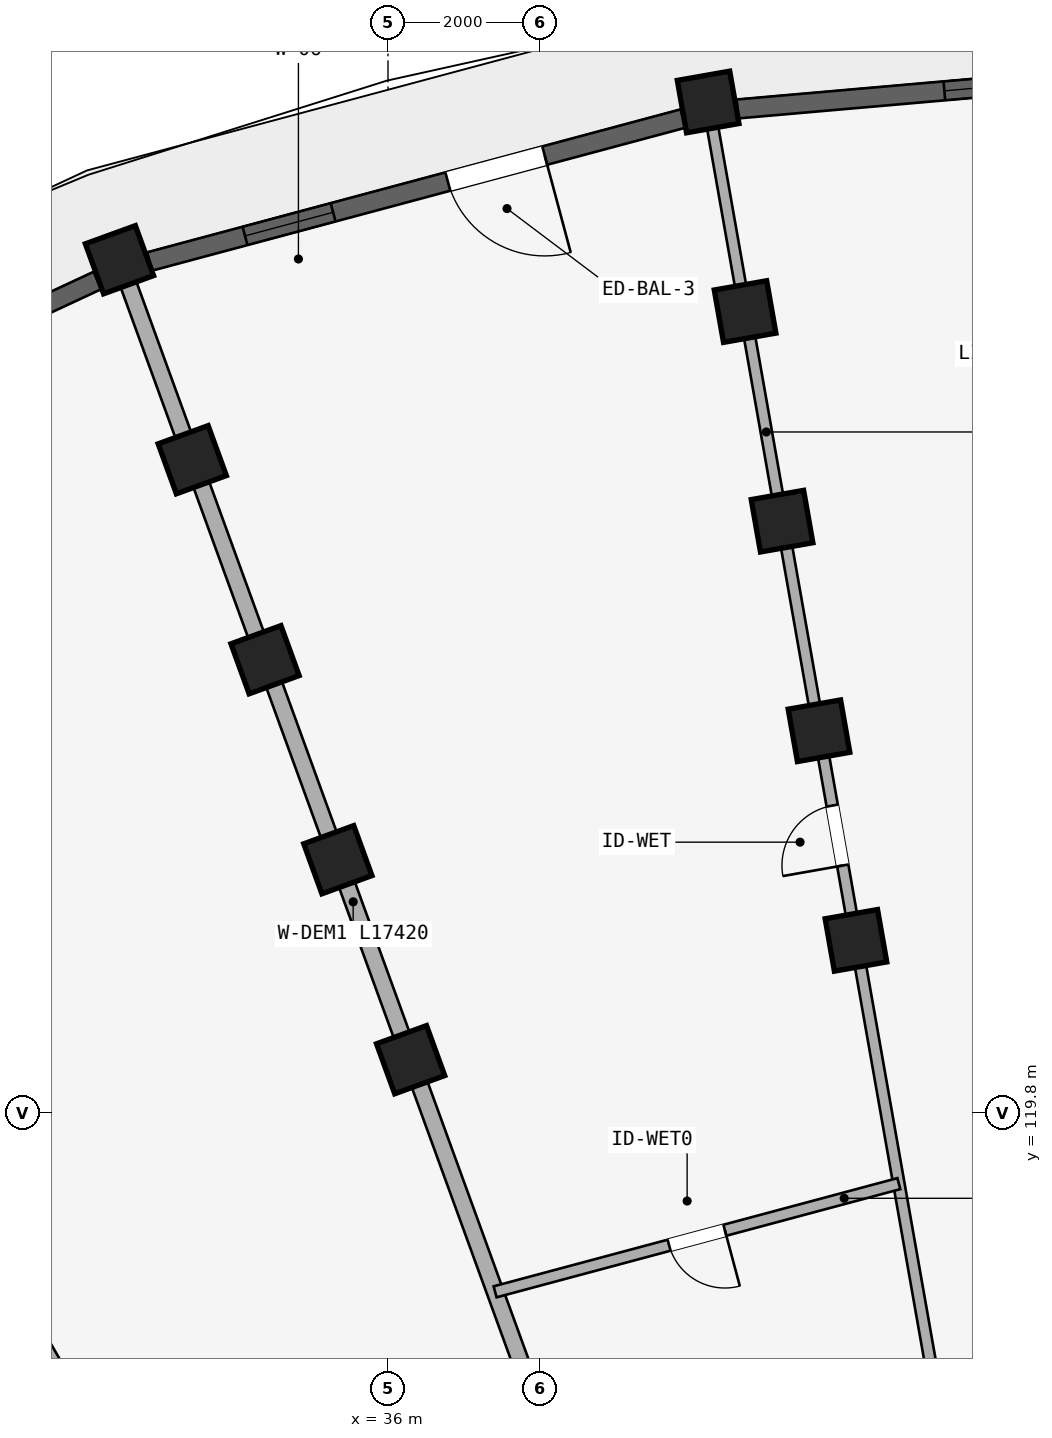
"""IFC4 building model, lengths in metres.
Left out: names, types, materials, properties, quantities, classifications, styles, units other than length and angle.
Written with IfcOpenShell. Run it as: python <this file> out.ifc"""

import sys

from ifc_helpers import new_model, si_unit, direction, frame, frame_2d, origin, origin_2d, place, context, subcontext, project, spatial, rectangle, extrude, element, fill, save


model = new_model("IFC4")
c1 = context("Model", 3, precision=1e-05, world=origin(), true_north=direction((0.0, 1.0)))
c2 = subcontext(c1, "Body", "Model", "MODEL_VIEW")
j1 = project(units=[si_unit("LENGTHUNIT", "METRE"), si_unit("PLANEANGLEUNIT", "RADIAN")], contexts=[c1])
p1 = place(None, origin())
s1 = spatial("IfcSite", under=j1, at=p1, CompositionType="ELEMENT")
p2 = place(p1, origin())
s2 = spatial("IfcBuilding", under=s1, at=p2, CompositionType="ELEMENT")
p3 = place(p2, frame((0.0, 0.0, 24.45)))
s3 = spatial("IfcBuildingStorey", under=s2, at=p3, CompositionType="ELEMENT", Elevation=24.45)
for number, where, z_axis, x_axis in (
    (1, (42.157, 122.071, 0.0), (0.0, 0.0, 1.0), (0.985, 0.174, 0.0)),
    (2, (41.671, 124.829, 0.0), (0.0, 0.0, 1.0), (0.985, 0.174, 0.0)),
    (3, (41.185, 127.586, 0.0), (0.0, 0.0, 1.0), (0.985, 0.174, 0.0)),
    (4, (40.698, 130.344, 0.0), (0.0, 0.0, 1.0), (0.985, 0.174, 0.0)),
    (5, (40.212, 133.101, 0.0), (0.0, 0.0, 1.0), (0.985, 0.174, 0.0)),
    (6, (36.298, 120.501, 0.0), (0.0, 0.0, 1.0), (0.94, 0.342, 0.0)),
    (7, (35.34, 123.132, 0.0), (0.0, 0.0, 1.0), (0.94, 0.342, 0.0)),
    (8, (34.382, 125.764, 0.0), (0.0, 0.0, 1.0), (0.94, 0.342, 0.0)),
    (9, (33.425, 128.395, 0.0), (0.0, 0.0, 1.0), (0.94, 0.342, 0.0)),
    (10, (32.467, 131.026, 0.0), (0.0, 0.0, 1.0), (0.94, 0.342, 0.0)),
):
    element("IfcColumn", number, at=place(p3, frame(where, z_axis=z_axis, x_axis=x_axis)), inside=s3, PredefinedType="COLUMN", context=c2, shape_type="SweptSolid", body=[
        extrude(rectangle(XDim=0.7, YDim=0.7, at=origin_2d()), origin(), (0.0, 0.0, 1.0), 2.93),
    ])
p4 = place(p3, frame((43.286, 115.67, 0.0), z_axis=(0.0, 0.0, 1.0), x_axis=(-0.173646216546, 0.984808098809, 0.0)))
e11 = element("IfcWall", 11, at=p4, inside=s3, PredefinedType="PARTITIONING", context=c2, shape_type="SweptSolid", body=[
    extrude(rectangle(XDim=17.42, YDim=0.15, at=frame_2d((8.71, 0.0))), origin(), (0.0, 0.0, 1.0), 2.372),
])
p5 = place(p4, frame((7.5, 0.0, 0.0)))
e12 = element("IfcOpeningElement", 12, at=p5, cuts=e11, PredefinedType="OPENING", context=c2, shape_type="SweptSolid", body=[
    extrude(rectangle(XDim=0.8, YDim=2.1, at=frame_2d((0.4, 1.05))), frame((0.0, 0.085, 0.0), z_axis=(0.0, -1.0, 0.0), x_axis=(1.0, 0.0, 0.0)), (0.0, 0.0, 1.0), 0.17),
])
p6 = place(p3, frame((38.521, 114.393, 0.0), z_axis=(0.0, 0.0, 1.0), x_axis=(-0.342022120477, 0.939691901159, 0.0)))
e13 = element("IfcWall", 13, at=p6, inside=s3, PredefinedType="STANDARD", context=c2, shape_type="SweptSolid", body=[
    extrude(rectangle(XDim=17.42, YDim=0.22, at=frame_2d((8.71, 0.0))), origin(), (0.0, 0.0, 1.0), 2.372),
])
p7 = place(p3, frame((34.05, 112.309, 0.0), z_axis=(0.0, 0.0, 1.0), x_axis=(-0.499997843263, 0.866026648973, 0.0)))
e14 = element("IfcWall", 14, at=p7, inside=s3, PredefinedType="PARTITIONING", context=c2, shape_type="SweptSolid", body=[
    extrude(rectangle(XDim=17.42, YDim=0.15, at=frame_2d((8.71, 0.0))), origin(), (0.0, 0.0, 1.0), 2.372),
])
p8 = place(p7, frame((7.5, 0.0, 0.0)))
e15 = element("IfcOpeningElement", 15, at=p8, cuts=e14, PredefinedType="OPENING", context=c2, shape_type="SweptSolid", body=[
    extrude(rectangle(XDim=0.8, YDim=2.1, at=frame_2d((0.4, 1.05))), frame((0.0, 0.085, 0.0), z_axis=(0.0, -1.0, 0.0), x_axis=(1.0, 0.0, 0.0)), (0.0, 0.0, 1.0), 0.17),
])
p9 = place(p3, frame((42.721, 118.871, 0.0), z_axis=(0.0, 0.0, 1.0), x_axis=(-0.965929227513, -0.258806351229, 0.0)))
e16 = element("IfcWall", 16, at=p9, inside=s3, PredefinedType="PLUMBINGWALL", context=c2, shape_type="SweptSolid", body=[
    extrude(rectangle(XDim=5.5, YDim=0.15, at=frame_2d((2.75, 0.0))), origin(), (0.0, 0.0, 1.0), 2.372),
])
p10 = place(p9, frame((2.37, 0.0, 0.0)))
e17 = element("IfcOpeningElement", 17, at=p10, cuts=e16, PredefinedType="OPENING", context=c2, shape_type="SweptSolid", body=[
    extrude(rectangle(XDim=0.76, YDim=2.05, at=frame_2d((0.38, 1.025))), frame((0.0, 0.085, 0.0), z_axis=(0.0, -1.0, 0.0), x_axis=(1.0, 0.0, 0.0)), (0.0, 0.0, 1.0), 0.17),
])
p11 = place(p3, frame((47.836, 133.643, 0.0), z_axis=(0.0, 0.0, 1.0), x_axis=(-0.99619214922, -0.08718487158, 0.0)))
e18 = element("IfcWall", 18, at=p11, inside=s3, PredefinedType="STANDARD", context=c2, shape_type="SweptSolid", body=[
    extrude(rectangle(XDim=7.267, YDim=0.25, at=frame_2d((3.633, 0.0))), origin(), (0.0, 0.0, 1.0), 2.372),
])
p12 = place(p11, frame((2.733, 0.0, 0.522)))
e19 = element("IfcOpeningElement", 19, at=p12, cuts=e18, PredefinedType="OPENING", context=c2, shape_type="SweptSolid", body=[
    extrude(rectangle(XDim=1.8, YDim=1.65, at=frame_2d((0.9, 0.825))), frame((0.0, 0.135, 0.0), z_axis=(0.0, -1.0, 0.0), x_axis=(1.0, 0.0, 0.0)), (0.0, 0.0, 1.0), 0.27),
])
p13 = place(p3, frame((39.882, 132.883, 0.0), z_axis=(0.0, 0.0, 1.0), x_axis=(-0.965930355787, -0.258802140196, 0.0)))
e20 = element("IfcWall", 20, at=p13, inside=s3, PredefinedType="STANDARD", context=c2, shape_type="SweptSolid", body=[
    extrude(rectangle(XDim=7.267, YDim=0.25, at=frame_2d((3.633, 0.0))), origin(), (0.0, 0.0, 1.0), 2.372),
])
p14 = place(p13, frame((4.766, 0.0, 0.422)))
e21 = element("IfcOpeningElement", 21, at=p14, cuts=e20, PredefinedType="OPENING", context=c2, shape_type="SweptSolid", body=[
    extrude(rectangle(XDim=1.2, YDim=1.5, at=frame_2d((0.6, 0.75))), frame((0.0, 0.135, 0.0), z_axis=(0.0, -1.0, 0.0), x_axis=(1.0, 0.0, 0.0)), (0.0, 0.0, 1.0), 0.27),
])
p15 = place(p13, frame((1.883, 0.0, 0.0)))
e22 = element("IfcOpeningElement", 22, at=p15, cuts=e20, PredefinedType="OPENING", context=c2, shape_type="SweptSolid", body=[
    extrude(rectangle(XDim=1.32, YDim=2.15, at=frame_2d((0.66, 1.075))), frame((0.0, 0.135, 0.0), z_axis=(0.0, -1.0, 0.0), x_axis=(1.0, 0.0, 0.0)), (0.0, 0.0, 1.0), 0.27),
])
p16 = place(p3, frame((32.179, 130.754, 0.0), z_axis=(0.0, 0.0, 1.0), x_axis=(-0.90630327107, -0.422627946127, 0.0)))
e23 = element("IfcWall", 23, at=p16, inside=s3, PredefinedType="STANDARD", context=c2, shape_type="SweptSolid", body=[
    extrude(rectangle(XDim=7.267, YDim=0.25, at=frame_2d((3.633, 0.0))), origin(), (0.0, 0.0, 1.0), 2.372),
])
p17 = place(p16, frame((2.733, 0.0, 0.522)))
e24 = element("IfcOpeningElement", 24, at=p17, cuts=e23, PredefinedType="OPENING", context=c2, shape_type="SweptSolid", body=[
    extrude(rectangle(XDim=1.8, YDim=1.65, at=frame_2d((0.9, 0.825))), frame((0.0, 0.135, 0.0), z_axis=(0.0, -1.0, 0.0), x_axis=(1.0, 0.0, 0.0)), (0.0, 0.0, 1.0), 0.27),
])
p18 = place(p12, origin())
e25 = element("IfcWindow", 25, at=p18, inside=s3, PartitioningType="DOUBLE_PANEL_VERTICAL", PredefinedType="WINDOW", context=c2, shape_type="SweptSolid", body=[
    extrude(rectangle(XDim=1.8, YDim=1.65, at=frame_2d((0.9, 0.825))), frame((0.0, 0.03, 0.0), z_axis=(0.0, -1.0, 0.0), x_axis=(1.0, 0.0, 0.0)), (0.0, 0.0, 1.0), 0.06),
])
fill(e19, e25)
p19 = place(p14, origin())
e26 = element("IfcWindow", 26, at=p19, inside=s3, PartitioningType="SINGLE_PANEL", PredefinedType="WINDOW", context=c2, shape_type="SweptSolid", body=[
    extrude(rectangle(XDim=1.2, YDim=1.5, at=frame_2d((0.6, 0.75))), frame((0.0, 0.03, 0.0), z_axis=(0.0, -1.0, 0.0), x_axis=(1.0, 0.0, 0.0)), (0.0, 0.0, 1.0), 0.06),
])
fill(e21, e26)
p20 = place(p5, frame((0.8, 0.0, 0.0), z_axis=(0.0, 0.0, 1.0), x_axis=(-1.0, 0.0, 0.0)))
e27 = element("IfcDoor", 27, at=p20, inside=s3, OperationType="SINGLE_SWING_RIGHT", PredefinedType="DOOR", context=c2, shape_type="SweptSolid", body=[
    extrude(rectangle(XDim=0.8, YDim=2.1, at=frame_2d((0.4, 1.05))), frame((0.0, 0.025, 0.0), z_axis=(0.0, -1.0, 0.0), x_axis=(1.0, 0.0, 0.0)), (0.0, 0.0, 1.0), 0.05),
])
fill(e12, e27)
p21 = place(p10, origin())
e28 = element("IfcDoor", 28, at=p21, inside=s3, OperationType="SINGLE_SWING_LEFT", PredefinedType="DOOR", context=c2, shape_type="SweptSolid", body=[
    extrude(rectangle(XDim=0.76, YDim=2.05, at=frame_2d((0.38, 1.025))), frame((0.0, 0.025, 0.0), z_axis=(0.0, -1.0, 0.0), x_axis=(1.0, 0.0, 0.0)), (0.0, 0.0, 1.0), 0.05),
])
fill(e17, e28)
p22 = place(p15, frame((1.32, 0.0, 0.0), z_axis=(0.0, 0.0, 1.0), x_axis=(-1.0, 0.0, 0.0)))
e29 = element("IfcDoor", 29, at=p22, inside=s3, OperationType="SINGLE_SWING_RIGHT", PredefinedType="DOOR", context=c2, shape_type="SweptSolid", body=[
    extrude(rectangle(XDim=1.32, YDim=2.15, at=frame_2d((0.66, 1.075))), frame((0.0, 0.025, 0.0), z_axis=(0.0, -1.0, 0.0), x_axis=(1.0, 0.0, 0.0)), (0.0, 0.0, 1.0), 0.05),
])
fill(e22, e29)
save(model, sys.argv[1])
